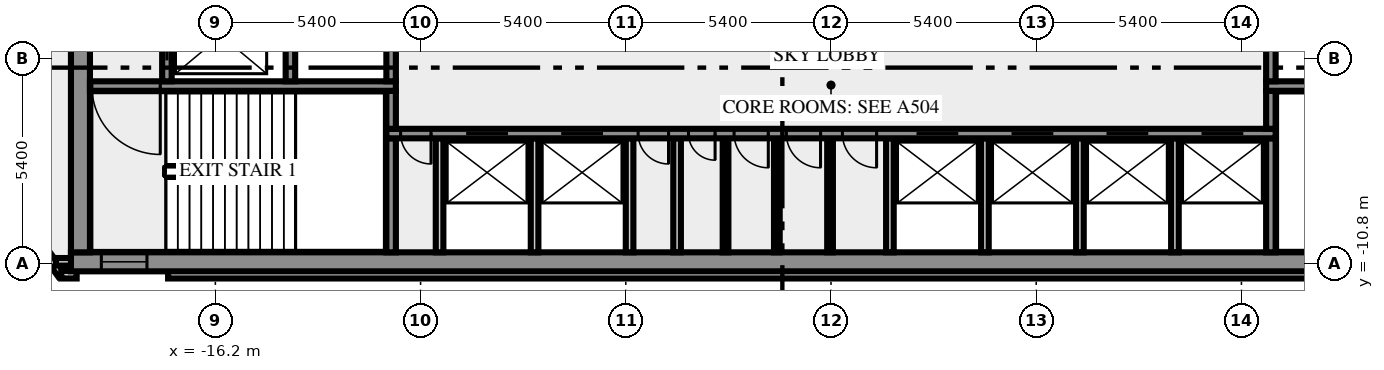
"""IFC4 building model, lengths in metres.
Left out: names, types, materials, properties, quantities, classifications, styles, units other than length and angle.
Written with IfcOpenShell. Run it as: python <this file> out.ifc"""

import sys

from ifc_helpers import new_model, si_unit, direction, frame, frame_2d, origin, place, context, subcontext, project, spatial, rectangle, extrude, element, fill, save


model = new_model("IFC4")
c1 = context("Model", 3, precision=1e-05, world=origin(), true_north=direction((0.0, 1.0)))
c2 = subcontext(c1, "Body", "Model", "MODEL_VIEW")
j1 = project(units=[si_unit("LENGTHUNIT", "METRE"), si_unit("PLANEANGLEUNIT", "RADIAN")], contexts=[c1])
p1 = place(None, origin())
s1 = spatial("IfcSite", under=j1, at=p1, CompositionType="ELEMENT")
p2 = place(p1, origin())
s2 = spatial("IfcBuilding", under=s1, at=p2, CompositionType="ELEMENT")
p3 = place(p2, frame((0.0, 0.0, 248.0)))
s3 = spatial("IfcBuildingStorey", under=s2, at=p3, CompositionType="ELEMENT", Elevation=248.0)
p4 = place(p3, frame((-21.833, -8.909, 0.0), z_axis=(0.0, 0.0, 1.0), x_axis=(0.587766567315, -0.809030569476, 0.0)))
e1 = element("IfcWall", 1, at=p4, inside=s3, PredefinedType="SOLIDWALL", context=c2, shape_type="SweptSolid", body=[
    extrude(rectangle(XDim=2.688, YDim=0.2, at=frame_2d((1.344, 0.0))), origin(), (0.0, 0.0, 1.0), 4.65),
])
p5 = place(p3, frame((-20.256, -11.088, 0.0), z_axis=(0.0, 0.0, 1.0), x_axis=(1.0, 0.0, 0.0)))
e2 = element("IfcWall", 2, at=p5, inside=s3, PredefinedType="SOLIDWALL", context=c2, shape_type="SweptSolid", body=[
    extrude(rectangle(XDim=0.406, YDim=0.2, at=frame_2d((0.203, 0.0))), origin(), (0.0, 0.0, 1.0), 4.65),
])
p6 = place(p3, frame((-17.444, -11.088, 0.0), z_axis=(0.0, 0.0, 1.0), x_axis=(1.0, 0.0, 0.0)))
e3 = element("IfcWall", 3, at=p6, inside=s3, PredefinedType="SOLIDWALL", context=c2, shape_type="SweptSolid", body=[
    extrude(rectangle(XDim=34.888, YDim=0.2, at=frame_2d((17.444, 0.0))), origin(), (0.0, 0.0, 1.0), 4.65),
])
p7 = place(p3, frame((-19.98, -10.75, 0.0), z_axis=(0.0, 0.0, 1.0), x_axis=(-1.0, 0.0, 0.0)))
e4 = element("IfcWall", 4, at=p7, inside=s3, PredefinedType="SOLIDWALL", context=c2, shape_type="SweptSolid", body=[
    extrude(rectangle(XDim=0.417, YDim=0.2, at=frame_2d((0.208, 0.0))), origin(), (0.0, 0.0, 1.0), 4.65),
])
p8 = place(p3, frame((-20.0, -10.75, 0.0), z_axis=(0.0, 0.0, 1.0), x_axis=(1.0, 0.0, 0.0)))
e5 = element("IfcWall", 5, at=p8, inside=s3, PredefinedType="SHEAR", context=c2, shape_type="SweptSolid", body=[
    extrude(rectangle(XDim=40.0, YDim=0.5, at=frame_2d((20.0, 0.0))), origin(), (0.0, 0.0, 1.0), 4.65),
])
p9 = place(p8, frame((0.8, 0.0, 1.0)))
e6 = element("IfcOpeningElement", 6, at=p9, cuts=e5, PredefinedType="OPENING", context=c2, shape_type="SweptSolid", body=[
    extrude(rectangle(XDim=1.2, YDim=1.2, at=frame_2d((0.6, 0.6))), frame((0.0, 0.26, 0.0), z_axis=(0.0, -1.0, 0.0), x_axis=(1.0, 0.0, 0.0)), (0.0, 0.0, 1.0), 0.52),
])
p10 = place(p8, frame((38.0, 0.0, 1.0)))
e7 = element("IfcOpeningElement", 7, at=p10, cuts=e5, PredefinedType="OPENING", context=c2, shape_type="SweptSolid", body=[
    extrude(rectangle(XDim=1.2, YDim=1.2, at=frame_2d((0.6, 0.6))), frame((0.0, 0.26, 0.0), z_axis=(0.0, -1.0, 0.0), x_axis=(1.0, 0.0, 0.0)), (0.0, 0.0, 1.0), 0.52),
])
p11 = place(p3, frame((-19.75, -10.5, 0.0), z_axis=(0.0, 0.0, 1.0), x_axis=(0.0, 1.0, 0.0)))
e8 = element("IfcWall", 8, at=p11, inside=s3, PredefinedType="SHEAR", context=c2, shape_type="SweptSolid", body=[
    extrude(rectangle(XDim=8.8, YDim=0.5, at=frame_2d((4.4, 0.0))), origin(), (0.0, 0.0, 1.0), 4.65),
])
p12 = place(p3, frame((-11.575, -10.5, 0.0), z_axis=(0.0, 0.0, 1.0), x_axis=(0.0, 1.0, 0.0)))
e9 = element("IfcWall", 9, at=p12, inside=s3, PredefinedType="SHEAR", context=c2, shape_type="SweptSolid", body=[
    extrude(rectangle(XDim=3.0, YDim=0.25, at=frame_2d((1.5, 0.0))), origin(), (0.0, 0.0, 1.0), 4.65),
])
for number, where, z_axis, x_axis in (
    (10, (-10.3, -10.5, 0.0), (0.0, 0.0, 1.0), (0.0, 1.0, 0.0)),
    (11, (-7.8, -10.5, 0.0), (0.0, 0.0, 1.0), (0.0, 1.0, 0.0)),
    (12, (-5.3, -10.5, 0.0), (0.0, 0.0, 1.0), (0.0, 1.0, 0.0)),
    (13, (-4.05, -10.5, 0.0), (0.0, 0.0, 1.0), (0.0, 1.0, 0.0)),
):
    element("IfcWall", number, at=place(p3, frame(where, z_axis=z_axis, x_axis=x_axis)), inside=s3, PredefinedType="SOLIDWALL", context=c2, shape_type="SweptSolid", body=[
        extrude(rectangle(XDim=3.0, YDim=0.2, at=frame_2d((1.5, 0.0))), origin(), (0.0, 0.0, 1.0), 4.65),
    ])
for number, where, z_axis, x_axis in (
    (14, (-2.775, -10.5, 0.0), (0.0, 0.0, 1.0), (0.0, 1.0, 0.0)),
    (15, (-1.425, -10.5, 0.0), (0.0, 0.0, 1.0), (0.0, 1.0, 0.0)),
    (16, (-0.025, -10.5, 0.0), (0.0, 0.0, 1.0), (0.0, 1.0, 0.0)),
):
    element("IfcWall", number, at=place(p3, frame(where, z_axis=z_axis, x_axis=x_axis)), inside=s3, PredefinedType="PARTITIONING", context=c2, shape_type="SweptSolid", body=[
        extrude(rectangle(XDim=3.0, YDim=0.15, at=frame_2d((1.5, 0.0))), origin(), (0.0, 0.0, 1.0), 4.65),
    ])
for number, where, z_axis, x_axis in (
    (17, (1.55, -10.5, 0.0), (0.0, 0.0, 1.0), (0.0, 1.0, 0.0)),
    (18, (4.05, -10.5, 0.0), (0.0, 0.0, 1.0), (0.0, 1.0, 0.0)),
    (19, (6.55, -10.5, 0.0), (0.0, 0.0, 1.0), (0.0, 1.0, 0.0)),
    (20, (9.05, -10.5, 0.0), (0.0, 0.0, 1.0), (0.0, 1.0, 0.0)),
):
    element("IfcWall", number, at=place(p3, frame(where, z_axis=z_axis, x_axis=x_axis)), inside=s3, PredefinedType="SOLIDWALL", context=c2, shape_type="SweptSolid", body=[
        extrude(rectangle(XDim=3.0, YDim=0.2, at=frame_2d((1.5, 0.0))), origin(), (0.0, 0.0, 1.0), 4.65),
    ])
p13 = place(p3, frame((11.575, -10.5, 0.0), z_axis=(0.0, 0.0, 1.0), x_axis=(0.0, 1.0, 0.0)))
e21 = element("IfcWall", 21, at=p13, inside=s3, PredefinedType="SHEAR", context=c2, shape_type="SweptSolid", body=[
    extrude(rectangle(XDim=3.0, YDim=0.25, at=frame_2d((1.5, 0.0))), origin(), (0.0, 0.0, 1.0), 4.65),
])
p14 = place(p3, frame((11.7, -7.375, 0.0), z_axis=(0.0, 0.0, 1.0), x_axis=(-1.0, 0.0, 0.0)))
e22 = element("IfcWall", 22, at=p14, inside=s3, PredefinedType="SHEAR", context=c2, shape_type="SweptSolid", body=[
    extrude(rectangle(XDim=23.4, YDim=0.25, at=frame_2d((11.7, 0.0))), origin(), (0.0, 0.0, 1.0), 4.65),
])
p15 = place(p14, frame((22.225, 0.0, 0.0)))
e23 = element("IfcOpeningElement", 23, at=p15, cuts=e22, PredefinedType="OPENING", context=c2, shape_type="SweptSolid", body=[
    extrude(rectangle(XDim=0.8, YDim=2.1, at=frame_2d((0.4, 1.05))), frame((0.0, 0.135, 0.0), z_axis=(0.0, -1.0, 0.0), x_axis=(1.0, 0.0, 0.0)), (0.0, 0.0, 1.0), 0.27),
])
p16 = place(p14, frame((20.2, 0.0, 0.0)))
e24 = element("IfcOpeningElement", 24, at=p16, cuts=e22, PredefinedType="OPENING", context=c2, shape_type="SweptSolid", body=[
    extrude(rectangle(XDim=1.1, YDim=2.1, at=frame_2d((0.55, 1.05))), frame((0.0, 0.135, 0.0), z_axis=(0.0, -1.0, 0.0), x_axis=(1.0, 0.0, 0.0)), (0.0, 0.0, 1.0), 0.27),
])
p17 = place(p14, frame((17.7, 0.0, 0.0)))
e25 = element("IfcOpeningElement", 25, at=p17, cuts=e22, PredefinedType="OPENING", context=c2, shape_type="SweptSolid", body=[
    extrude(rectangle(XDim=1.1, YDim=2.1, at=frame_2d((0.55, 1.05))), frame((0.0, 0.135, 0.0), z_axis=(0.0, -1.0, 0.0), x_axis=(1.0, 0.0, 0.0)), (0.0, 0.0, 1.0), 0.27),
])
p18 = place(p14, frame((15.975, 0.0, 0.0)))
e26 = element("IfcOpeningElement", 26, at=p18, cuts=e22, PredefinedType="OPENING", context=c2, shape_type="SweptSolid", body=[
    extrude(rectangle(XDim=0.8, YDim=2.1, at=frame_2d((0.4, 1.05))), frame((0.0, 0.135, 0.0), z_axis=(0.0, -1.0, 0.0), x_axis=(1.0, 0.0, 0.0)), (0.0, 0.0, 1.0), 0.27),
])
p19 = place(p14, frame((14.75, 0.0, 0.0)))
e27 = element("IfcOpeningElement", 27, at=p19, cuts=e22, PredefinedType="OPENING", context=c2, shape_type="SweptSolid", body=[
    extrude(rectangle(XDim=0.7, YDim=2.1, at=frame_2d((0.35, 1.05))), frame((0.0, 0.135, 0.0), z_axis=(0.0, -1.0, 0.0), x_axis=(1.0, 0.0, 0.0)), (0.0, 0.0, 1.0), 0.27),
])
p20 = place(p14, frame((13.35, 0.0, 0.0)))
e28 = element("IfcOpeningElement", 28, at=p20, cuts=e22, PredefinedType="OPENING", context=c2, shape_type="SweptSolid", body=[
    extrude(rectangle(XDim=0.9, YDim=2.1, at=frame_2d((0.45, 1.05))), frame((0.0, 0.135, 0.0), z_axis=(0.0, -1.0, 0.0), x_axis=(1.0, 0.0, 0.0)), (0.0, 0.0, 1.0), 0.27),
])
p21 = place(p14, frame((11.975, 0.0, 0.0)))
e29 = element("IfcOpeningElement", 29, at=p21, cuts=e22, PredefinedType="OPENING", context=c2, shape_type="SweptSolid", body=[
    extrude(rectangle(XDim=0.9, YDim=2.1, at=frame_2d((0.45, 1.05))), frame((0.0, 0.135, 0.0), z_axis=(0.0, -1.0, 0.0), x_axis=(1.0, 0.0, 0.0)), (0.0, 0.0, 1.0), 0.27),
])
p22 = place(p14, frame((10.5, 0.0, 0.0)))
e30 = element("IfcOpeningElement", 30, at=p22, cuts=e22, PredefinedType="OPENING", context=c2, shape_type="SweptSolid", body=[
    extrude(rectangle(XDim=0.9, YDim=2.1, at=frame_2d((0.45, 1.05))), frame((0.0, 0.135, 0.0), z_axis=(0.0, -1.0, 0.0), x_axis=(1.0, 0.0, 0.0)), (0.0, 0.0, 1.0), 0.27),
])
p23 = place(p14, frame((8.35, 0.0, 0.0)))
e31 = element("IfcOpeningElement", 31, at=p23, cuts=e22, PredefinedType="OPENING", context=c2, shape_type="SweptSolid", body=[
    extrude(rectangle(XDim=1.1, YDim=2.1, at=frame_2d((0.55, 1.05))), frame((0.0, 0.135, 0.0), z_axis=(0.0, -1.0, 0.0), x_axis=(1.0, 0.0, 0.0)), (0.0, 0.0, 1.0), 0.27),
])
p24 = place(p14, frame((5.85, 0.0, 0.0)))
e32 = element("IfcOpeningElement", 32, at=p24, cuts=e22, PredefinedType="OPENING", context=c2, shape_type="SweptSolid", body=[
    extrude(rectangle(XDim=1.1, YDim=2.1, at=frame_2d((0.55, 1.05))), frame((0.0, 0.135, 0.0), z_axis=(0.0, -1.0, 0.0), x_axis=(1.0, 0.0, 0.0)), (0.0, 0.0, 1.0), 0.27),
])
p25 = place(p14, frame((3.35, 0.0, 0.0)))
e33 = element("IfcOpeningElement", 33, at=p25, cuts=e22, PredefinedType="OPENING", context=c2, shape_type="SweptSolid", body=[
    extrude(rectangle(XDim=1.1, YDim=2.1, at=frame_2d((0.55, 1.05))), frame((0.0, 0.135, 0.0), z_axis=(0.0, -1.0, 0.0), x_axis=(1.0, 0.0, 0.0)), (0.0, 0.0, 1.0), 0.27),
])
p26 = place(p14, frame((0.85, 0.0, 0.0)))
e34 = element("IfcOpeningElement", 34, at=p26, cuts=e22, PredefinedType="OPENING", context=c2, shape_type="SweptSolid", body=[
    extrude(rectangle(XDim=1.1, YDim=2.1, at=frame_2d((0.55, 1.05))), frame((0.0, 0.135, 0.0), z_axis=(0.0, -1.0, 0.0), x_axis=(1.0, 0.0, 0.0)), (0.0, 0.0, 1.0), 0.27),
])
for number, where, z_axis, x_axis in (
    (35, (-11.575, -7.25, 0.0), (0.0, 0.0, 1.0), (0.0, 1.0, 0.0)),
    (36, (11.575, -7.25, 0.0), (0.0, 0.0, 1.0), (0.0, 1.0, 0.0)),
):
    element("IfcWall", number, at=place(p3, frame(where, z_axis=z_axis, x_axis=x_axis)), inside=s3, PredefinedType="SHEAR", context=c2, shape_type="SweptSolid", body=[
        extrude(rectangle(XDim=1.0, YDim=0.25, at=frame_2d((0.5, 0.0))), origin(), (0.0, 0.0, 1.0), 4.65),
    ])
p27 = place(p3, frame((-11.45, -6.125, 0.0), z_axis=(0.0, 0.0, 1.0), x_axis=(-1.0, 0.0, 0.0)))
e37 = element("IfcWall", 37, at=p27, inside=s3, PredefinedType="SHEAR", context=c2, shape_type="SweptSolid", body=[
    extrude(rectangle(XDim=8.05, YDim=0.25, at=frame_2d((4.025, 0.0))), origin(), (0.0, 0.0, 1.0), 4.65),
])
p28 = place(p27, frame((6.2, 0.0, 0.0)))
e38 = element("IfcOpeningElement", 38, at=p28, cuts=e37, PredefinedType="OPENING", context=c2, shape_type="SweptSolid", body=[
    extrude(rectangle(XDim=1.8, YDim=2.1, at=frame_2d((0.9, 1.05))), frame((0.0, 0.135, 0.0), z_axis=(0.0, -1.0, 0.0), x_axis=(1.0, 0.0, 0.0)), (0.0, 0.0, 1.0), 0.27),
])
p29 = place(p3, frame((19.5, -6.125, 0.0), z_axis=(0.0, 0.0, 1.0), x_axis=(-1.0, 0.0, 0.0)))
e39 = element("IfcWall", 39, at=p29, inside=s3, PredefinedType="SHEAR", context=c2, shape_type="SweptSolid", body=[
    extrude(rectangle(XDim=8.05, YDim=0.25, at=frame_2d((4.025, 0.0))), origin(), (0.0, 0.0, 1.0), 4.65),
])
p30 = place(p29, frame((0.05, 0.0, 0.0)))
e40 = element("IfcOpeningElement", 40, at=p30, cuts=e39, PredefinedType="OPENING", context=c2, shape_type="SweptSolid", body=[
    extrude(rectangle(XDim=1.8, YDim=2.1, at=frame_2d((0.9, 1.05))), frame((0.0, 0.135, 0.0), z_axis=(0.0, -1.0, 0.0), x_axis=(1.0, 0.0, 0.0)), (0.0, 0.0, 1.0), 0.27),
])
p31 = place(p3, frame((-17.475, -6.0, 0.0), z_axis=(0.0, 0.0, 1.0), x_axis=(0.0, 1.0, 0.0)))
e41 = element("IfcWall", 41, at=p31, inside=s3, PredefinedType="SHEAR", context=c2, shape_type="SweptSolid", body=[
    extrude(rectangle(XDim=4.3, YDim=0.25, at=frame_2d((2.15, 0.0))), origin(), (0.0, 0.0, 1.0), 4.65),
])
p32 = place(p31, frame((0.55, 0.0, 0.0)))
e42 = element("IfcOpeningElement", 42, at=p32, cuts=e41, PredefinedType="OPENING", context=c2, shape_type="SweptSolid", body=[
    extrude(rectangle(XDim=1.3, YDim=2.1, at=frame_2d((0.65, 1.05))), frame((0.0, 0.135, 0.0), z_axis=(0.0, -1.0, 0.0), x_axis=(1.0, 0.0, 0.0)), (0.0, 0.0, 1.0), 0.27),
])
for number, where, z_axis, x_axis in (
    (43, (-14.225, -6.0, 0.0), (0.0, 0.0, 1.0), (0.0, 1.0, 0.0)),
    (44, (-11.575, -6.0, 0.0), (0.0, 0.0, 1.0), (0.0, 1.0, 0.0)),
    (45, (11.575, -6.0, 0.0), (0.0, 0.0, 1.0), (0.0, 1.0, 0.0)),
):
    element("IfcWall", number, at=place(p3, frame(where, z_axis=z_axis, x_axis=x_axis)), inside=s3, PredefinedType="SHEAR", context=c2, shape_type="SweptSolid", body=[
        extrude(rectangle(XDim=1.75, YDim=0.25, at=frame_2d((0.875, 0.0))), origin(), (0.0, 0.0, 1.0), 4.65),
    ])
p33 = place(p9, origin())
e46 = element("IfcWindow", 46, at=p33, inside=s3, PartitioningType="SINGLE_PANEL", PredefinedType="WINDOW", context=c2, shape_type="SweptSolid", body=[
    extrude(rectangle(XDim=1.2, YDim=1.2, at=frame_2d((0.6, 0.6))), frame((0.0, 0.03, 0.0), z_axis=(0.0, -1.0, 0.0), x_axis=(1.0, 0.0, 0.0)), (0.0, 0.0, 1.0), 0.06),
])
fill(e6, e46)
p34 = place(p15, origin())
e47 = element("IfcDoor", 47, at=p34, inside=s3, OperationType="SINGLE_SWING_RIGHT", PredefinedType="DOOR", context=c2, shape_type="SweptSolid", body=[
    extrude(rectangle(XDim=0.8, YDim=2.1, at=frame_2d((0.4, 1.05))), frame((0.0, 0.025, 0.0), z_axis=(0.0, -1.0, 0.0), x_axis=(1.0, 0.0, 0.0)), (0.0, 0.0, 1.0), 0.05),
])
fill(e23, e47)
p35 = place(p16, origin())
e48 = element("IfcDoor", 48, at=p35, inside=s3, OperationType="DOUBLE_DOOR_SLIDING", PredefinedType="DOOR", context=c2, shape_type="SweptSolid", body=[
    extrude(rectangle(XDim=1.1, YDim=2.1, at=frame_2d((0.55, 1.05))), frame((0.0, 0.025, 0.0), z_axis=(0.0, -1.0, 0.0), x_axis=(1.0, 0.0, 0.0)), (0.0, 0.0, 1.0), 0.05),
])
fill(e24, e48)
p36 = place(p17, origin())
e49 = element("IfcDoor", 49, at=p36, inside=s3, OperationType="DOUBLE_DOOR_SLIDING", PredefinedType="DOOR", context=c2, shape_type="SweptSolid", body=[
    extrude(rectangle(XDim=1.1, YDim=2.1, at=frame_2d((0.55, 1.05))), frame((0.0, 0.025, 0.0), z_axis=(0.0, -1.0, 0.0), x_axis=(1.0, 0.0, 0.0)), (0.0, 0.0, 1.0), 0.05),
])
fill(e25, e49)
p37 = place(p18, origin())
e50 = element("IfcDoor", 50, at=p37, inside=s3, OperationType="SINGLE_SWING_RIGHT", PredefinedType="DOOR", context=c2, shape_type="SweptSolid", body=[
    extrude(rectangle(XDim=0.8, YDim=2.1, at=frame_2d((0.4, 1.05))), frame((0.0, 0.025, 0.0), z_axis=(0.0, -1.0, 0.0), x_axis=(1.0, 0.0, 0.0)), (0.0, 0.0, 1.0), 0.05),
])
fill(e26, e50)
p38 = place(p19, origin())
e51 = element("IfcDoor", 51, at=p38, inside=s3, OperationType="SINGLE_SWING_RIGHT", PredefinedType="DOOR", context=c2, shape_type="SweptSolid", body=[
    extrude(rectangle(XDim=0.7, YDim=2.1, at=frame_2d((0.35, 1.05))), frame((0.0, 0.025, 0.0), z_axis=(0.0, -1.0, 0.0), x_axis=(1.0, 0.0, 0.0)), (0.0, 0.0, 1.0), 0.05),
])
fill(e27, e51)
p39 = place(p20, origin())
e52 = element("IfcDoor", 52, at=p39, inside=s3, OperationType="SINGLE_SWING_RIGHT", PredefinedType="DOOR", context=c2, shape_type="SweptSolid", body=[
    extrude(rectangle(XDim=0.9, YDim=2.1, at=frame_2d((0.45, 1.05))), frame((0.0, 0.025, 0.0), z_axis=(0.0, -1.0, 0.0), x_axis=(1.0, 0.0, 0.0)), (0.0, 0.0, 1.0), 0.05),
])
fill(e28, e52)
p40 = place(p21, origin())
e53 = element("IfcDoor", 53, at=p40, inside=s3, OperationType="SINGLE_SWING_RIGHT", PredefinedType="DOOR", context=c2, shape_type="SweptSolid", body=[
    extrude(rectangle(XDim=0.9, YDim=2.1, at=frame_2d((0.45, 1.05))), frame((0.0, 0.025, 0.0), z_axis=(0.0, -1.0, 0.0), x_axis=(1.0, 0.0, 0.0)), (0.0, 0.0, 1.0), 0.05),
])
fill(e29, e53)
p41 = place(p22, origin())
e54 = element("IfcDoor", 54, at=p41, inside=s3, OperationType="SINGLE_SWING_LEFT", PredefinedType="DOOR", context=c2, shape_type="SweptSolid", body=[
    extrude(rectangle(XDim=0.9, YDim=2.1, at=frame_2d((0.45, 1.05))), frame((0.0, 0.025, 0.0), z_axis=(0.0, -1.0, 0.0), x_axis=(1.0, 0.0, 0.0)), (0.0, 0.0, 1.0), 0.05),
])
fill(e30, e54)
p42 = place(p23, origin())
e55 = element("IfcDoor", 55, at=p42, inside=s3, OperationType="DOUBLE_DOOR_SLIDING", PredefinedType="DOOR", context=c2, shape_type="SweptSolid", body=[
    extrude(rectangle(XDim=1.1, YDim=2.1, at=frame_2d((0.55, 1.05))), frame((0.0, 0.025, 0.0), z_axis=(0.0, -1.0, 0.0), x_axis=(1.0, 0.0, 0.0)), (0.0, 0.0, 1.0), 0.05),
])
fill(e31, e55)
p43 = place(p24, origin())
e56 = element("IfcDoor", 56, at=p43, inside=s3, OperationType="DOUBLE_DOOR_SLIDING", PredefinedType="DOOR", context=c2, shape_type="SweptSolid", body=[
    extrude(rectangle(XDim=1.1, YDim=2.1, at=frame_2d((0.55, 1.05))), frame((0.0, 0.025, 0.0), z_axis=(0.0, -1.0, 0.0), x_axis=(1.0, 0.0, 0.0)), (0.0, 0.0, 1.0), 0.05),
])
fill(e32, e56)
p44 = place(p25, origin())
e57 = element("IfcDoor", 57, at=p44, inside=s3, OperationType="DOUBLE_DOOR_SLIDING", PredefinedType="DOOR", context=c2, shape_type="SweptSolid", body=[
    extrude(rectangle(XDim=1.1, YDim=2.1, at=frame_2d((0.55, 1.05))), frame((0.0, 0.025, 0.0), z_axis=(0.0, -1.0, 0.0), x_axis=(1.0, 0.0, 0.0)), (0.0, 0.0, 1.0), 0.05),
])
fill(e33, e57)
p45 = place(p26, origin())
e58 = element("IfcDoor", 58, at=p45, inside=s3, OperationType="DOUBLE_DOOR_SLIDING", PredefinedType="DOOR", context=c2, shape_type="SweptSolid", body=[
    extrude(rectangle(XDim=1.1, YDim=2.1, at=frame_2d((0.55, 1.05))), frame((0.0, 0.025, 0.0), z_axis=(0.0, -1.0, 0.0), x_axis=(1.0, 0.0, 0.0)), (0.0, 0.0, 1.0), 0.05),
])
fill(e34, e58)
p46 = place(p28, origin())
e59 = element("IfcDoor", 59, at=p46, inside=s3, OperationType="DOUBLE_DOOR_SINGLE_SWING", PredefinedType="DOOR", context=c2, shape_type="SweptSolid", body=[
    extrude(rectangle(XDim=1.8, YDim=2.1, at=frame_2d((0.9, 1.05))), frame((0.0, 0.025, 0.0), z_axis=(0.0, -1.0, 0.0), x_axis=(1.0, 0.0, 0.0)), (0.0, 0.0, 1.0), 0.05),
])
fill(e38, e59)
p47 = place(p32, origin())
e60 = element("IfcDoor", 60, at=p47, inside=s3, OperationType="DOUBLE_DOOR_SLIDING", PredefinedType="DOOR", context=c2, shape_type="SweptSolid", body=[
    extrude(rectangle(XDim=1.3, YDim=2.1, at=frame_2d((0.65, 1.05))), frame((0.0, 0.025, 0.0), z_axis=(0.0, -1.0, 0.0), x_axis=(1.0, 0.0, 0.0)), (0.0, 0.0, 1.0), 0.05),
])
fill(e42, e60)
save(model, sys.argv[1])
